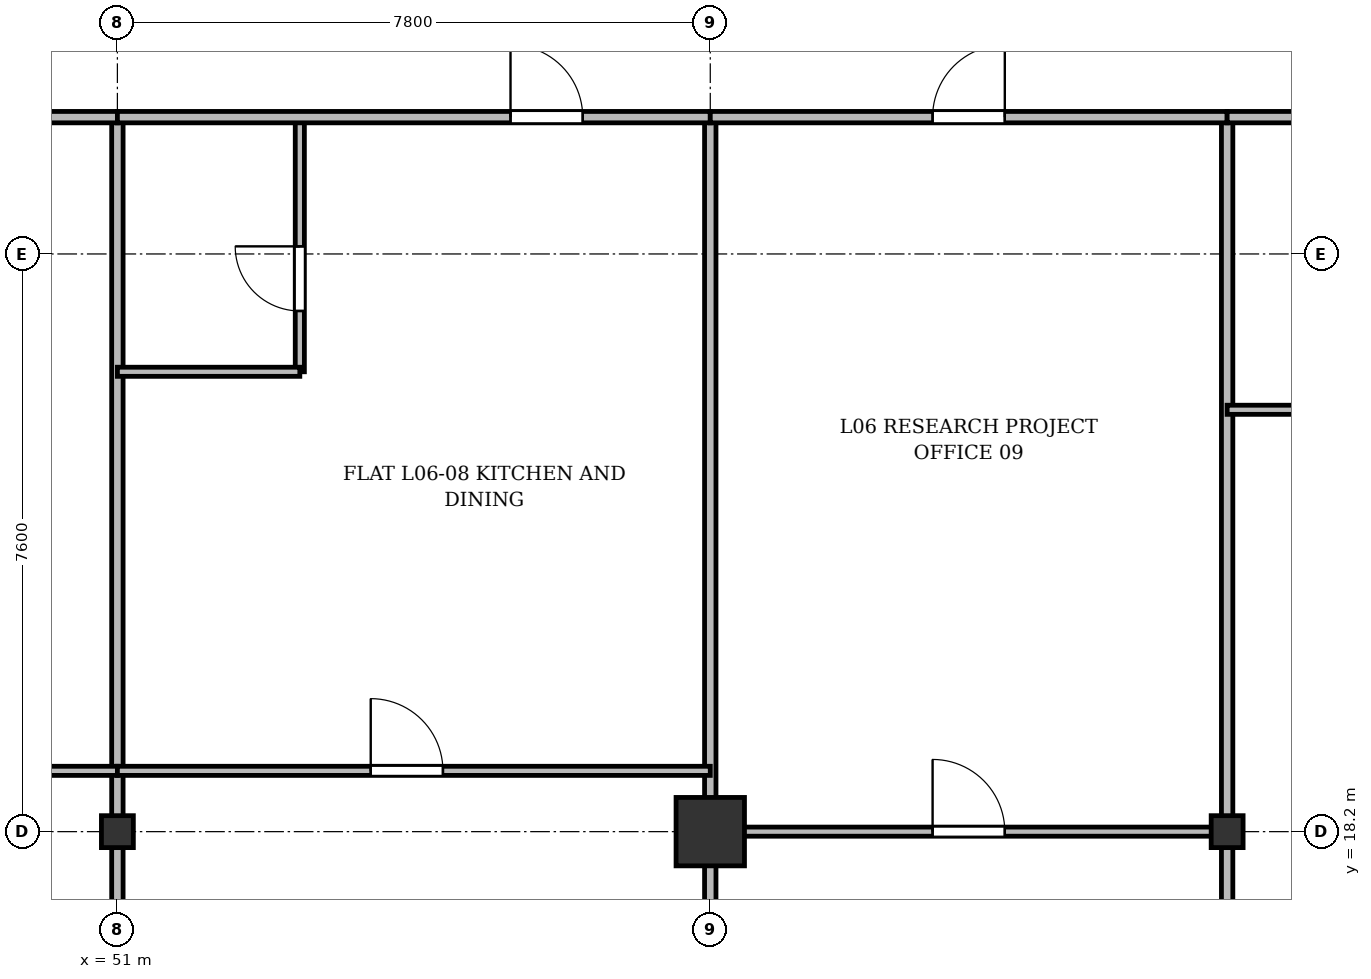
"""IFC4 building model, lengths in metres.
Left out: names, types, materials, properties, quantities, classifications, styles, units other than length and angle.
Written with IfcOpenShell. Run it as: python <this file> out.ifc"""

import sys

from ifc_helpers import new_model, si_unit, direction, frame, frame_2d, origin, origin_2d, place, context, subcontext, project, spatial, rectangle, i_section, extrude, source, transform, mapped, element, fill, save


model = new_model("IFC4")
c1 = context("Model", 3, precision=1e-05, world=origin(), true_north=direction((0.0, 1.0)))
c2 = subcontext(c1, "Body", "Model", "MODEL_VIEW")
j1 = project(units=[si_unit("LENGTHUNIT", "METRE"), si_unit("PLANEANGLEUNIT", "RADIAN")], contexts=[c1])
p1 = place(None, origin())
s1 = spatial("IfcSite", under=j1, at=p1, CompositionType="ELEMENT")
p2 = place(p1, origin())
s2 = spatial("IfcBuilding", under=s1, at=p2, CompositionType="ELEMENT")
p3 = place(p2, frame((0.0, 0.0, 27.1)))
s3 = spatial("IfcBuildingStorey", under=s2, at=p3, CompositionType="ELEMENT", Elevation=27.1)
m1 = source(origin(), c2, "Body", "SweptSolid", [
    extrude(i_section(OverallWidth=0.42, OverallDepth=0.42, WebThickness=0.026, FlangeThickness=0.04, at=origin_2d()), origin(), (0.0, 0.0, 1.0), 3.6),
])
p4 = place(p3, frame((51.0, 18.2, 0.0), z_axis=(0.0, 0.0, 1.0), x_axis=(1.0, 0.0, 0.0)))
e1 = element("IfcColumn", 1, at=p4, inside=s3, PredefinedType="COLUMN", context=c2, shape_type="MappedRepresentation", body=[
    mapped(m1, transform((0.0, 0.0, 0.0), x_axis=(1.0, 0.0, 0.0), y_axis=(0.0, 1.0, 0.0), z_axis=(0.0, 0.0, 1.0), scale=1.0)),
])
m2 = source(origin(), c2, "Body", "SweptSolid", [
    extrude(rectangle(XDim=0.9, YDim=0.9, at=origin_2d()), origin(), (0.0, 0.0, 1.0), 3.6),
])
p5 = place(p3, frame((58.8, 18.2, 0.0), z_axis=(0.0, 0.0, 1.0), x_axis=(1.0, 0.0, 0.0)))
e2 = element("IfcColumn", 2, at=p5, inside=s3, PredefinedType="COLUMN", context=c2, shape_type="MappedRepresentation", body=[
    mapped(m2, transform((0.0, 0.0, 0.0), x_axis=(1.0, 0.0, 0.0), y_axis=(0.0, 1.0, 0.0), z_axis=(0.0, 0.0, 1.0), scale=1.0)),
])
p6 = place(p3, frame((65.6, 18.2, 0.0), z_axis=(0.0, 0.0, 1.0), x_axis=(1.0, 0.0, 0.0)))
e3 = element("IfcColumn", 3, at=p6, inside=s3, PredefinedType="COLUMN", context=c2, shape_type="MappedRepresentation", body=[
    mapped(m1, transform((0.0, 0.0, 0.0), x_axis=(1.0, 0.0, 0.0), y_axis=(0.0, 1.0, 0.0), z_axis=(0.0, 0.0, 1.0), scale=1.0)),
])
for number, where, z_axis, x_axis in (
    (4, (51.0, 3.145, 0.0), (0.0, 0.0, 1.0), (0.0, 1.0, 0.0)),
    (5, (58.8, 3.145, 0.0), (0.0, 0.0, 1.0), (0.0, 1.0, 0.0)),
    (6, (65.6, 3.145, 0.0), (0.0, 0.0, 1.0), (0.0, 1.0, 0.0)),
):
    element("IfcWall", number, at=place(p3, frame(where, z_axis=z_axis, x_axis=x_axis)), inside=s3, PredefinedType="PARTITIONING", context=c2, shape_type="SweptSolid", body=[
        extrude(rectangle(XDim=24.455, YDim=0.15, at=frame_2d((12.228, 0.0))), origin(), (0.0, 0.0, 1.0), 2.752),
    ])
p7 = place(p3, frame((43.8, 19.0, 0.0), z_axis=(0.0, 0.0, 1.0), x_axis=(1.0, 0.0, 0.0)))
e7 = element("IfcWall", 7, at=p7, inside=s3, PredefinedType="PARTITIONING", context=c2, shape_type="SweptSolid", body=[
    extrude(rectangle(XDim=7.2, YDim=0.12, at=frame_2d((3.6, 0.0))), origin(), (0.0, 0.0, 1.0), 2.752),
])
p8 = place(p7, frame((3.125, 0.0, 0.0)))
e8 = element("IfcOpeningElement", 8, at=p8, cuts=e7, PredefinedType="OPENING", context=c2, shape_type="SweptSolid", body=[
    extrude(rectangle(XDim=0.95, YDim=2.15, at=frame_2d((0.475, 1.075))), frame((0.0, 0.07, 0.0), z_axis=(0.0, -1.0, 0.0), x_axis=(1.0, 0.0, 0.0)), (0.0, 0.0, 1.0), 0.14),
])
p9 = place(p3, frame((43.8, 27.6, 0.0), z_axis=(0.0, 0.0, 1.0), x_axis=(1.0, 0.0, 0.0)))
e9 = element("IfcWall", 9, at=p9, inside=s3, PredefinedType="PARTITIONING", context=c2, shape_type="SweptSolid", body=[
    extrude(rectangle(XDim=7.2, YDim=0.15, at=frame_2d((3.6, 0.0))), origin(), (0.0, 0.0, 1.0), 2.752),
])
p10 = place(p9, frame((4.706, 0.0, 0.0)))
e10 = element("IfcOpeningElement", 10, at=p10, cuts=e9, PredefinedType="OPENING", context=c2, shape_type="SweptSolid", body=[
    extrude(rectangle(XDim=0.95, YDim=2.15, at=frame_2d((0.475, 1.075))), frame((0.0, 0.085, 0.0), z_axis=(0.0, -1.0, 0.0), x_axis=(1.0, 0.0, 0.0)), (0.0, 0.0, 1.0), 0.17),
])
p11 = place(p3, frame((51.0, 19.0, 0.0), z_axis=(0.0, 0.0, 1.0), x_axis=(1.0, 0.0, 0.0)))
e11 = element("IfcWall", 11, at=p11, inside=s3, PredefinedType="PARTITIONING", context=c2, shape_type="SweptSolid", body=[
    extrude(rectangle(XDim=7.8, YDim=0.12, at=frame_2d((3.9, 0.0))), origin(), (0.0, 0.0, 1.0), 2.752),
])
p12 = place(p11, frame((3.333, 0.0, 0.0)))
e12 = element("IfcOpeningElement", 12, at=p12, cuts=e11, PredefinedType="OPENING", context=c2, shape_type="SweptSolid", body=[
    extrude(rectangle(XDim=0.95, YDim=2.15, at=frame_2d((0.475, 1.075))), frame((0.0, 0.07, 0.0), z_axis=(0.0, -1.0, 0.0), x_axis=(1.0, 0.0, 0.0)), (0.0, 0.0, 1.0), 0.14),
])
p13 = place(p3, frame((53.4, 24.25, 0.0), z_axis=(0.0, 0.0, 1.0), x_axis=(0.0, 1.0, 0.0)))
e13 = element("IfcWall", 13, at=p13, inside=s3, PredefinedType="PARTITIONING", context=c2, shape_type="SweptSolid", body=[
    extrude(rectangle(XDim=3.35, YDim=0.12, at=frame_2d((1.675, 0.0))), origin(), (0.0, 0.0, 1.0), 2.94),
])
p14 = place(p13, frame((0.8, 0.0, 0.0)))
e14 = element("IfcOpeningElement", 14, at=p14, cuts=e13, PredefinedType="OPENING", context=c2, shape_type="SweptSolid", body=[
    extrude(rectangle(XDim=0.85, YDim=2.1, at=frame_2d((0.425, 1.05))), frame((0.0, 0.07, 0.0), z_axis=(0.0, -1.0, 0.0), x_axis=(1.0, 0.0, 0.0)), (0.0, 0.0, 1.0), 0.14),
])
p15 = place(p3, frame((51.0, 24.25, 0.0), z_axis=(0.0, 0.0, 1.0), x_axis=(1.0, 0.0, 0.0)))
e15 = element("IfcWall", 15, at=p15, inside=s3, PredefinedType="PARTITIONING", context=c2, shape_type="SweptSolid", body=[
    extrude(rectangle(XDim=2.4, YDim=0.12, at=frame_2d((1.2, 0.0))), origin(), (0.0, 0.0, 1.0), 2.752),
])
p16 = place(p3, frame((51.0, 27.6, 0.0), z_axis=(0.0, 0.0, 1.0), x_axis=(1.0, 0.0, 0.0)))
e16 = element("IfcWall", 16, at=p16, inside=s3, PredefinedType="PARTITIONING", context=c2, shape_type="SweptSolid", body=[
    extrude(rectangle(XDim=7.8, YDim=0.15, at=frame_2d((3.9, 0.0))), origin(), (0.0, 0.0, 1.0), 2.752),
])
p17 = place(p16, frame((5.172, 0.0, 0.0)))
e17 = element("IfcOpeningElement", 17, at=p17, cuts=e16, PredefinedType="OPENING", context=c2, shape_type="SweptSolid", body=[
    extrude(rectangle(XDim=0.95, YDim=2.15, at=frame_2d((0.475, 1.075))), frame((0.0, 0.085, 0.0), z_axis=(0.0, -1.0, 0.0), x_axis=(1.0, 0.0, 0.0)), (0.0, 0.0, 1.0), 0.17),
])
p18 = place(p3, frame((58.8, 27.6, 0.0), z_axis=(0.0, 0.0, 1.0), x_axis=(1.0, 0.0, 0.0)))
e18 = element("IfcWall", 18, at=p18, inside=s3, PredefinedType="PARTITIONING", context=c2, shape_type="SweptSolid", body=[
    extrude(rectangle(XDim=6.8, YDim=0.15, at=frame_2d((3.4, 0.0))), origin(), (0.0, 0.0, 1.0), 2.752),
])
p19 = place(p18, frame((2.925, 0.0, 0.0)))
e19 = element("IfcOpeningElement", 19, at=p19, cuts=e18, PredefinedType="OPENING", context=c2, shape_type="SweptSolid", body=[
    extrude(rectangle(XDim=0.95, YDim=2.15, at=frame_2d((0.475, 1.075))), frame((0.0, 0.085, 0.0), z_axis=(0.0, -1.0, 0.0), x_axis=(1.0, 0.0, 0.0)), (0.0, 0.0, 1.0), 0.17),
])
p20 = place(p3, frame((58.8, 18.2, 0.0), z_axis=(0.0, 0.0, 1.0), x_axis=(1.0, 0.0, 0.0)))
e20 = element("IfcWall", 20, at=p20, inside=s3, PredefinedType="PARTITIONING", context=c2, shape_type="SweptSolid", body=[
    extrude(rectangle(XDim=6.8, YDim=0.12, at=frame_2d((3.4, 0.0))), origin(), (0.0, 0.0, 1.0), 2.69),
])
p21 = place(p20, frame((2.925, 0.0, 0.0)))
e21 = element("IfcOpeningElement", 21, at=p21, cuts=e20, PredefinedType="OPENING", context=c2, shape_type="SweptSolid", body=[
    extrude(rectangle(XDim=0.95, YDim=2.15, at=frame_2d((0.475, 1.075))), frame((0.0, 0.07, 0.0), z_axis=(0.0, -1.0, 0.0), x_axis=(1.0, 0.0, 0.0)), (0.0, 0.0, 1.0), 0.14),
])
p22 = place(p3, frame((65.6, 27.6, 0.0), z_axis=(0.0, 0.0, 1.0), x_axis=(1.0, 0.0, 0.0)))
e22 = element("IfcWall", 22, at=p22, inside=s3, PredefinedType="PARTITIONING", context=c2, shape_type="SweptSolid", body=[
    extrude(rectangle(XDim=4.055, YDim=0.15, at=frame_2d((2.027, 0.0))), origin(), (0.0, 0.0, 1.0), 2.752),
])
p23 = place(p22, frame((1.462, 0.0, 0.0)))
e23 = element("IfcOpeningElement", 23, at=p23, cuts=e22, PredefinedType="OPENING", context=c2, shape_type="SweptSolid", body=[
    extrude(rectangle(XDim=0.95, YDim=2.15, at=frame_2d((0.475, 1.075))), frame((0.0, 0.085, 0.0), z_axis=(0.0, -1.0, 0.0), x_axis=(1.0, 0.0, 0.0)), (0.0, 0.0, 1.0), 0.17),
])
p24 = place(p3, frame((65.6, 23.75, 0.0), z_axis=(0.0, 0.0, 1.0), x_axis=(1.0, 0.0, 0.0)))
e24 = element("IfcWall", 24, at=p24, inside=s3, PredefinedType="PARTITIONING", context=c2, shape_type="SweptSolid", body=[
    extrude(rectangle(XDim=4.055, YDim=0.12, at=frame_2d((2.027, 0.0))), origin(), (0.0, 0.0, 1.0), 2.752),
])
p25 = place(p24, frame((1.462, 0.0, 0.0)))
e25 = element("IfcOpeningElement", 25, at=p25, cuts=e24, PredefinedType="OPENING", context=c2, shape_type="SweptSolid", body=[
    extrude(rectangle(XDim=0.95, YDim=2.15, at=frame_2d((0.475, 1.075))), frame((0.0, 0.07, 0.0), z_axis=(0.0, -1.0, 0.0), x_axis=(1.0, 0.0, 0.0)), (0.0, 0.0, 1.0), 0.14),
])
m3 = source(origin(), c2, "Body", "SweptSolid", [
    extrude(rectangle(XDim=0.95, YDim=2.15, at=frame_2d((0.475, 1.075))), frame((0.0, 0.025, 0.0), z_axis=(0.0, -1.0, 0.0), x_axis=(1.0, 0.0, 0.0)), (0.0, 0.0, 1.0), 0.05),
])
p26 = place(p12, origin())
e26 = element("IfcDoor", 26, at=p26, inside=s3, OperationType="SINGLE_SWING_LEFT", PredefinedType="DOOR", context=c2, shape_type="MappedRepresentation", body=[
    mapped(m3, transform((0.0, 0.0, 0.0), x_axis=(1.0, 0.0, 0.0), y_axis=(0.0, 1.0, 0.0), z_axis=(0.0, 0.0, 1.0), scale=1.0)),
])
fill(e12, e26)
m4 = source(origin(), c2, "Body", "SweptSolid", [
    extrude(rectangle(XDim=0.85, YDim=2.1, at=frame_2d((0.425, 1.05))), frame((0.0, 0.025, 0.0), z_axis=(0.0, -1.0, 0.0), x_axis=(1.0, 0.0, 0.0)), (0.0, 0.0, 1.0), 0.05),
])
p27 = place(p14, origin())
e27 = element("IfcDoor", 27, at=p27, inside=s3, OperationType="SINGLE_SWING_RIGHT", PredefinedType="DOOR", context=c2, shape_type="MappedRepresentation", body=[
    mapped(m4, transform((0.0, 0.0, 0.0), x_axis=(1.0, 0.0, 0.0), y_axis=(0.0, 1.0, 0.0), z_axis=(0.0, 0.0, 1.0), scale=1.0)),
])
fill(e14, e27)
p28 = place(p17, origin())
e28 = element("IfcDoor", 28, at=p28, inside=s3, OperationType="SINGLE_SWING_LEFT", PredefinedType="DOOR", context=c2, shape_type="MappedRepresentation", body=[
    mapped(m3, transform((0.0, 0.0, 0.0), x_axis=(1.0, 0.0, 0.0), y_axis=(0.0, 1.0, 0.0), z_axis=(0.0, 0.0, 1.0), scale=1.0)),
])
fill(e17, e28)
p29 = place(p19, origin())
e29 = element("IfcDoor", 29, at=p29, inside=s3, OperationType="SINGLE_SWING_RIGHT", PredefinedType="DOOR", context=c2, shape_type="MappedRepresentation", body=[
    mapped(m3, transform((0.0, 0.0, 0.0), x_axis=(1.0, 0.0, 0.0), y_axis=(0.0, 1.0, 0.0), z_axis=(0.0, 0.0, 1.0), scale=1.0)),
])
fill(e19, e29)
p30 = place(p21, origin())
e30 = element("IfcDoor", 30, at=p30, inside=s3, OperationType="SINGLE_SWING_LEFT", PredefinedType="DOOR", context=c2, shape_type="MappedRepresentation", body=[
    mapped(m3, transform((0.0, 0.0, 0.0), x_axis=(1.0, 0.0, 0.0), y_axis=(0.0, 1.0, 0.0), z_axis=(0.0, 0.0, 1.0), scale=1.0)),
])
fill(e21, e30)
save(model, sys.argv[1])
